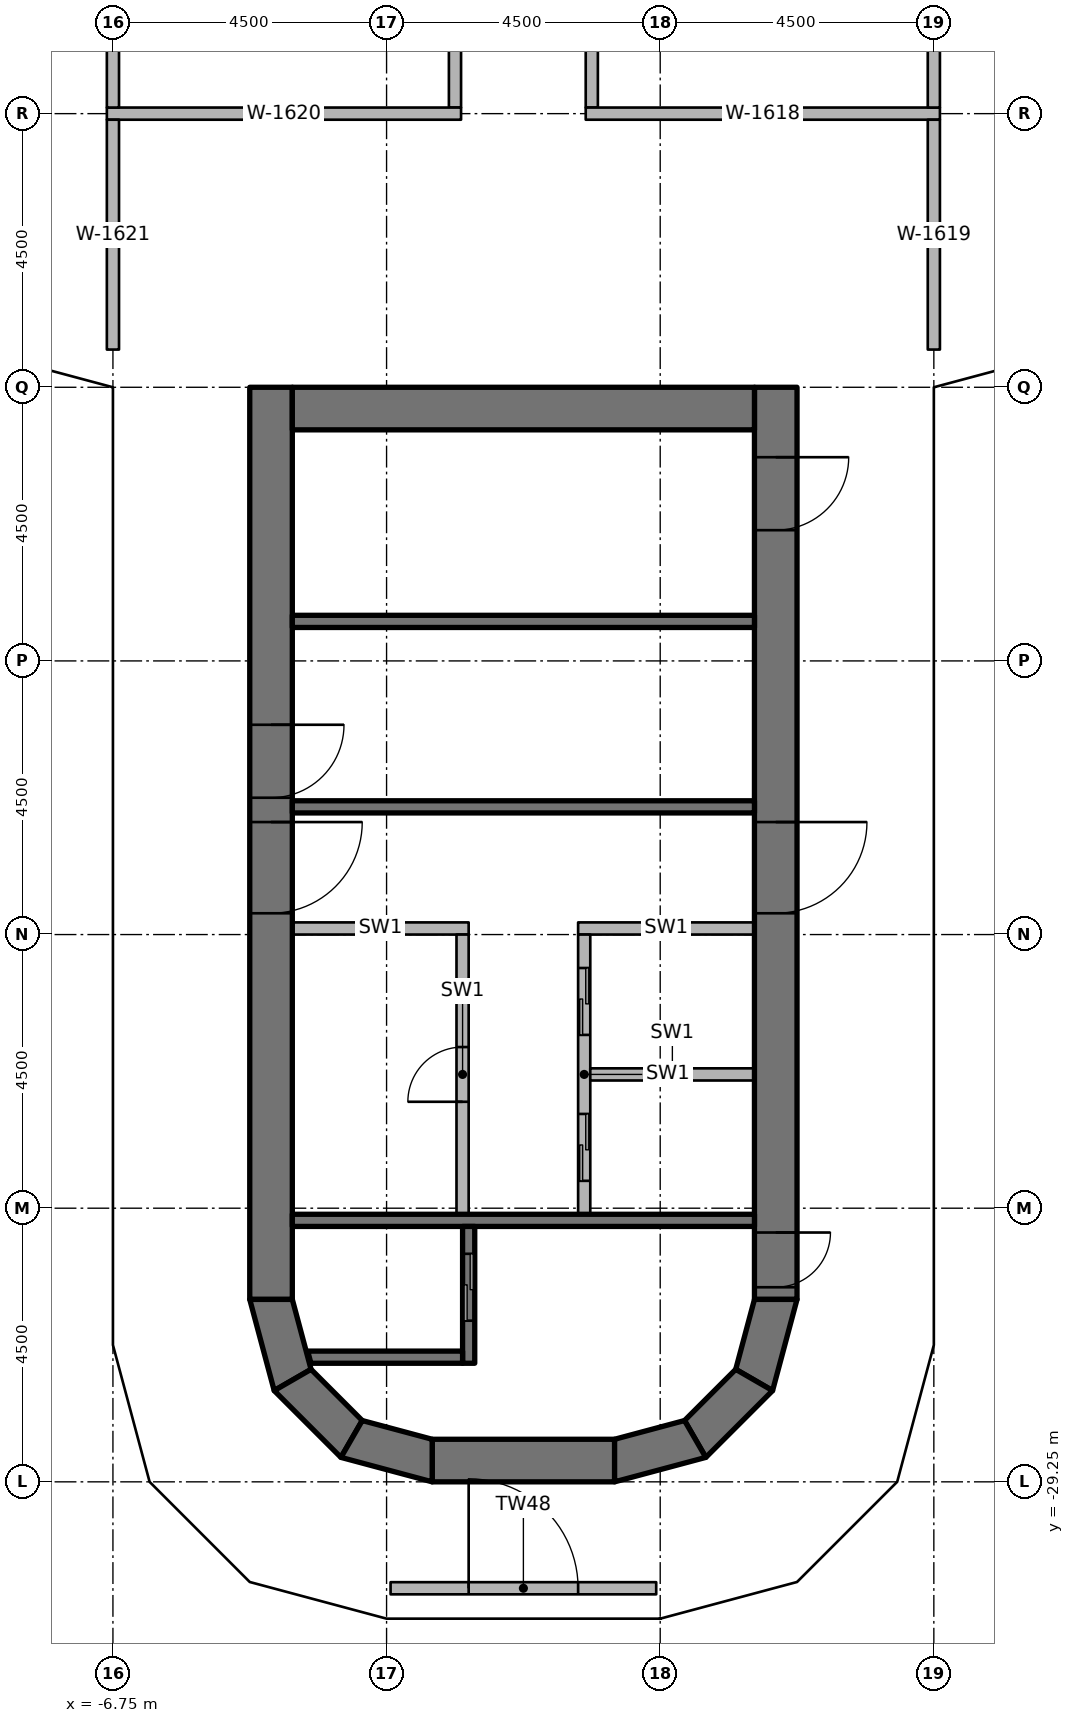
"""IFC4 building model, lengths in metres.
Left out: names, types, materials, properties, quantities, classifications, styles, units other than length and angle.
Written with IfcOpenShell. Run it as: python <this file> out.ifc"""

import sys

from ifc_helpers import new_model, si_unit, direction, frame, frame_2d, origin, origin_2d, place, context, subcontext, project, spatial, polyline, rectangle, outline, extrude, element, fill, save


model = new_model("IFC4")
c1 = context("Model", 3, precision=1e-05, world=origin(), true_north=direction((0.0, 1.0)))
c2 = subcontext(c1, "Body", "Model", "MODEL_VIEW")
j1 = project(units=[si_unit("LENGTHUNIT", "METRE"), si_unit("PLANEANGLEUNIT", "RADIAN")], contexts=[c1])
p1 = place(None, origin())
s1 = spatial("IfcSite", under=j1, at=p1, CompositionType="ELEMENT")
p2 = place(p1, origin())
s2 = spatial("IfcBuilding", under=s1, at=p2, CompositionType="ELEMENT")
p3 = place(p2, frame((0.0, 0.0, 156.2)))
s3 = spatial("IfcBuildingStorey", under=s2, at=p3, CompositionType="ELEMENT", Elevation=156.2)
for number, where, z_axis, x_axis in (
    (1, (-6.25, -26.9, 0.0), (0.0, 0.0, 1.0), (1.0, 0.0, 0.0)),
    (2, (-6.25, -24.65, 0.0), (0.0, 0.0, 1.0), (1.0, 0.0, 0.0)),
    (3, (-6.25, -20.25, 0.0), (0.0, 0.0, 1.0), (1.0, 0.0, 0.0)),
    (4, (-6.25, -15.75, 0.0), (0.0, 0.0, 1.0), (1.0, 0.0, 0.0)),
    (5, (-6.25, -10.75, 0.0), (0.0, 0.0, 1.0), (1.0, 0.0, 0.0)),
    (6, (-6.25, -6.25, 0.0), (0.0, 0.0, 1.0), (1.0, 0.0, 0.0)),
    (7, (6.25, -26.9, 0.0), (0.0, 0.0, 1.0), (1.0, 0.0, 0.0)),
    (8, (6.25, -24.65, 0.0), (0.0, 0.0, 1.0), (1.0, 0.0, 0.0)),
    (9, (6.25, -20.25, 0.0), (0.0, 0.0, 1.0), (1.0, 0.0, 0.0)),
    (10, (6.25, -15.75, 0.0), (0.0, 0.0, 1.0), (1.0, 0.0, 0.0)),
    (11, (6.25, -10.75, 0.0), (0.0, 0.0, 1.0), (1.0, 0.0, 0.0)),
    (12, (6.25, -6.25, 0.0), (0.0, 0.0, 1.0), (1.0, 0.0, 0.0)),
):
    element("IfcColumn", number, at=place(p3, frame(where, z_axis=z_axis, x_axis=x_axis)), inside=s3, PredefinedType="COLUMN", context=c2, shape_type="SweptSolid", body=[
        extrude(rectangle(XDim=0.8, YDim=0.8, at=origin_2d()), origin(), (0.0, 0.0, 1.0), 3.65),
    ])
p4 = place(p3, frame((-4.15, -11.25, 0.0), z_axis=(0.0, 0.0, 1.0), x_axis=(0.0, -1.0, 0.0)))
e13 = element("IfcWall", 13, at=p4, inside=s3, PredefinedType="SHEAR", context=c2, shape_type="SweptSolid", body=[
    extrude(rectangle(XDim=15.0, YDim=0.7, at=frame_2d((7.5, 0.0))), origin(), (0.0, 0.0, 1.0), 3.8),
])
p5 = place(p4, frame((7.15, 0.0, 0.0)))
e14 = element("IfcOpeningElement", 14, at=p5, cuts=e13, PredefinedType="OPENING", context=c2, shape_type="SweptSolid", body=[
    extrude(rectangle(XDim=1.5, YDim=2.3, at=frame_2d((0.75, 1.15))), frame((0.0, 0.36, 0.0), z_axis=(0.0, -1.0, 0.0), x_axis=(1.0, 0.0, 0.0)), (0.0, 0.0, 1.0), 0.72),
])
p6 = place(p4, frame((5.55, 0.0, 0.0)))
e15 = element("IfcOpeningElement", 15, at=p6, cuts=e13, PredefinedType="OPENING", context=c2, shape_type="SweptSolid", body=[
    extrude(rectangle(XDim=1.2, YDim=2.1, at=frame_2d((0.6, 1.05))), frame((0.0, 0.36, 0.0), z_axis=(0.0, -1.0, 0.0), x_axis=(1.0, 0.0, 0.0)), (0.0, 0.0, 1.0), 0.72),
])
p7 = place(p3, frame((4.15, -11.25, 0.0), z_axis=(0.0, 0.0, 1.0), x_axis=(0.0, -1.0, 0.0)))
e16 = element("IfcWall", 16, at=p7, inside=s3, PredefinedType="SHEAR", context=c2, shape_type="SweptSolid", body=[
    extrude(rectangle(XDim=15.0, YDim=0.7, at=frame_2d((7.5, 0.0))), origin(), (0.0, 0.0, 1.0), 3.8),
])
p8 = place(p7, frame((7.15, 0.0, 0.0)))
e17 = element("IfcOpeningElement", 17, at=p8, cuts=e16, PredefinedType="OPENING", context=c2, shape_type="SweptSolid", body=[
    extrude(rectangle(XDim=1.5, YDim=2.3, at=frame_2d((0.75, 1.15))), frame((0.0, 0.36, 0.0), z_axis=(0.0, -1.0, 0.0), x_axis=(1.0, 0.0, 0.0)), (0.0, 0.0, 1.0), 0.72),
])
p9 = place(p7, frame((13.9, 0.0, 0.0)))
e18 = element("IfcOpeningElement", 18, at=p9, cuts=e16, PredefinedType="OPENING", context=c2, shape_type="SweptSolid", body=[
    extrude(rectangle(XDim=0.9, YDim=2.1, at=frame_2d((0.45, 1.05))), frame((0.0, 0.36, 0.0), z_axis=(0.0, -1.0, 0.0), x_axis=(1.0, 0.0, 0.0)), (0.0, 0.0, 1.0), 0.72),
])
p10 = place(p7, frame((1.15, 0.0, 0.0)))
e19 = element("IfcOpeningElement", 19, at=p10, cuts=e16, PredefinedType="OPENING", context=c2, shape_type="SweptSolid", body=[
    extrude(rectangle(XDim=1.2, YDim=2.1, at=frame_2d((0.6, 1.05))), frame((0.0, 0.36, 0.0), z_axis=(0.0, -1.0, 0.0), x_axis=(1.0, 0.0, 0.0)), (0.0, 0.0, 1.0), 0.72),
])
p11 = place(p3, frame((-3.8, -11.6, 0.0), z_axis=(0.0, 0.0, 1.0), x_axis=(1.0, 0.0, 0.0)))
e20 = element("IfcWall", 20, at=p11, inside=s3, PredefinedType="SHEAR", context=c2, shape_type="SweptSolid", body=[
    extrude(rectangle(XDim=7.6, YDim=0.7, at=frame_2d((3.8, 0.0))), origin(), (0.0, 0.0, 1.0), 3.8),
])
p12 = place(p3, frame((-1.5, -28.9, 0.0), z_axis=(0.0, 0.0, 1.0), x_axis=(1.0, 0.0, 0.0)))
e21 = element("IfcWall", 21, at=p12, inside=s3, PredefinedType="SHEAR", context=c2, shape_type="SweptSolid", body=[
    extrude(rectangle(XDim=3.0, YDim=0.7, at=frame_2d((1.5, 0.0))), origin(), (0.0, 0.0, 1.0), 3.8),
])
p13 = place(p3, origin())
e22 = element("IfcWall", 22, at=p13, inside=s3, PredefinedType="SHEAR", context=c2, shape_type="SweptSolid", body=[
    extrude(outline(polyline([(-4.5, -26.25), (-4.098, -27.75), (-3.492, -27.4), (-3.8, -26.25), (-4.5, -26.25)])), origin(), (0.0, 0.0, 1.0), 3.8),
])
p14 = place(p3, origin())
e23 = element("IfcWall", 23, at=p14, inside=s3, PredefinedType="SHEAR", context=c2, shape_type="SweptSolid", body=[
    extrude(outline(polyline([(-4.098, -27.75), (-3.0, -28.848), (-2.65, -28.242), (-3.492, -27.4), (-4.098, -27.75)])), origin(), (0.0, 0.0, 1.0), 3.8),
])
p15 = place(p3, origin())
e24 = element("IfcWall", 24, at=p15, inside=s3, PredefinedType="SHEAR", context=c2, shape_type="SweptSolid", body=[
    extrude(outline(polyline([(-3.0, -28.848), (-1.5, -29.25), (-1.5, -28.55), (-2.65, -28.242), (-3.0, -28.848)])), origin(), (0.0, 0.0, 1.0), 3.8),
])
p16 = place(p3, origin())
e25 = element("IfcWall", 25, at=p16, inside=s3, PredefinedType="SHEAR", context=c2, shape_type="SweptSolid", body=[
    extrude(outline(polyline([(4.5, -26.25), (4.098, -27.75), (3.492, -27.4), (3.8, -26.25), (4.5, -26.25)])), origin(), (0.0, 0.0, 1.0), 3.8),
])
p17 = place(p3, origin())
e26 = element("IfcWall", 26, at=p17, inside=s3, PredefinedType="SHEAR", context=c2, shape_type="SweptSolid", body=[
    extrude(outline(polyline([(4.098, -27.75), (3.0, -28.848), (2.65, -28.242), (3.492, -27.4), (4.098, -27.75)])), origin(), (0.0, 0.0, 1.0), 3.8),
])
p18 = place(p3, origin())
e27 = element("IfcWall", 27, at=p18, inside=s3, PredefinedType="SHEAR", context=c2, shape_type="SweptSolid", body=[
    extrude(outline(polyline([(3.0, -28.848), (1.5, -29.25), (1.5, -28.55), (2.65, -28.242), (3.0, -28.848)])), origin(), (0.0, 0.0, 1.0), 3.8),
])
p19 = place(p3, frame((-2.184, -31.0, 0.0), z_axis=(0.0, 0.0, 1.0), x_axis=(1.0, 0.0, 0.0)))
e28 = element("IfcWall", 28, at=p19, inside=s3, PredefinedType="SOLIDWALL", context=c2, shape_type="SweptSolid", body=[
    extrude(rectangle(XDim=4.368, YDim=0.2, at=frame_2d((2.184, 0.0))), origin(), (0.0, 0.0, 1.0), 2.75),
])
p20 = place(p19, frame((1.284, 0.0, 0.0)))
e29 = element("IfcOpeningElement", 29, at=p20, cuts=e28, PredefinedType="OPENING", context=c2, shape_type="SweptSolid", body=[
    extrude(rectangle(XDim=1.8, YDim=2.4, at=frame_2d((0.9, 1.2))), frame((0.0, 0.11, 0.0), z_axis=(0.0, -1.0, 0.0), x_axis=(1.0, 0.0, 0.0)), (0.0, 0.0, 1.0), 0.22),
])
p21 = place(p3, frame((3.8, -24.95, 0.0), z_axis=(0.0, 0.0, 1.0), x_axis=(-1.0, 0.0, 0.0)))
e30 = element("IfcWall", 30, at=p21, inside=s3, PredefinedType="SHEAR", context=c2, shape_type="SweptSolid", body=[
    extrude(rectangle(XDim=7.6, YDim=0.2, at=frame_2d((3.8, 0.0))), origin(), (0.0, 0.0, 1.0), 3.65),
])
p22 = place(p3, frame((-0.9, -27.3, 0.0), z_axis=(0.0, 0.0, 1.0), x_axis=(0.0, 1.0, 0.0)))
e31 = element("IfcWall", 31, at=p22, inside=s3, PredefinedType="SHEAR", context=c2, shape_type="SweptSolid", body=[
    extrude(rectangle(XDim=2.25, YDim=0.2, at=frame_2d((1.125, 0.0))), origin(), (0.0, 0.0, 1.0), 3.65),
])
p23 = place(p22, frame((0.7, 0.0, 0.0)))
e32 = element("IfcOpeningElement", 32, at=p23, cuts=e31, PredefinedType="OPENING", context=c2, shape_type="SweptSolid", body=[
    extrude(rectangle(XDim=1.1, YDim=2.3, at=frame_2d((0.55, 1.15))), frame((0.0, 0.11, 0.0), z_axis=(0.0, -1.0, 0.0), x_axis=(1.0, 0.0, 0.0)), (0.0, 0.0, 1.0), 0.22),
])
p24 = place(p3, origin())
e33 = element("IfcWall", 33, at=p24, inside=s3, PredefinedType="SHEAR", context=c2, shape_type="SweptSolid", body=[
    extrude(outline(polyline([(-1.0, -27.1), (-3.548, -27.1), (-3.494, -27.3), (-1.0, -27.3), (-1.0, -27.1)])), origin(), (0.0, 0.0, 1.0), 3.65),
])
for number, where, z_axis, x_axis in (
    (34, (3.8, -18.15, 0.0), (0.0, 0.0, 1.0), (-1.0, 0.0, 0.0)),
    (35, (3.8, -15.1, 0.0), (0.0, 0.0, 1.0), (-1.0, 0.0, 0.0)),
):
    element("IfcWall", number, at=place(p3, frame(where, z_axis=z_axis, x_axis=x_axis)), inside=s3, PredefinedType="SHEAR", context=c2, shape_type="SweptSolid", body=[
        extrude(rectangle(XDim=7.6, YDim=0.2, at=frame_2d((3.8, 0.0))), origin(), (0.0, 0.0, 1.0), 3.65),
    ])
p25 = place(p3, frame((3.8, -20.15, 0.0), z_axis=(0.0, 0.0, 1.0), x_axis=(-1.0, 0.0, 0.0)))
e36 = element("IfcWall", 36, at=p25, inside=s3, PredefinedType="PARTITIONING", context=c2, shape_type="SweptSolid", body=[
    extrude(rectangle(XDim=2.9, YDim=0.2, at=frame_2d((1.45, 0.0))), origin(), (0.0, 0.0, 1.0), 3.65),
])
p26 = place(p3, frame((1.0, -24.85, 0.0), z_axis=(0.0, 0.0, 1.0), x_axis=(0.0, 1.0, 0.0)))
e37 = element("IfcWall", 37, at=p26, inside=s3, PredefinedType="PARTITIONING", context=c2, shape_type="SweptSolid", body=[
    extrude(rectangle(XDim=4.6, YDim=0.2, at=frame_2d((2.3, 0.0))), origin(), (0.0, 0.0, 1.0), 3.65),
])
p27 = place(p26, frame((0.55, 0.0, 0.0)))
e38 = element("IfcOpeningElement", 38, at=p27, cuts=e37, PredefinedType="OPENING", context=c2, shape_type="SweptSolid", body=[
    extrude(rectangle(XDim=1.1, YDim=2.3, at=frame_2d((0.55, 1.15))), frame((0.0, 0.11, 0.0), z_axis=(0.0, -1.0, 0.0), x_axis=(1.0, 0.0, 0.0)), (0.0, 0.0, 1.0), 0.22),
])
p28 = place(p26, frame((2.95, 0.0, 0.0)))
e39 = element("IfcOpeningElement", 39, at=p28, cuts=e37, PredefinedType="OPENING", context=c2, shape_type="SweptSolid", body=[
    extrude(rectangle(XDim=1.1, YDim=2.3, at=frame_2d((0.55, 1.15))), frame((0.0, 0.11, 0.0), z_axis=(0.0, -1.0, 0.0), x_axis=(1.0, 0.0, 0.0)), (0.0, 0.0, 1.0), 0.22),
])
p29 = place(p3, frame((-0.9, -20.15, 0.0), z_axis=(0.0, 0.0, 1.0), x_axis=(-1.0, 0.0, 0.0)))
e40 = element("IfcWall", 40, at=p29, inside=s3, PredefinedType="PARTITIONING", context=c2, shape_type="SweptSolid", body=[
    extrude(rectangle(XDim=2.9, YDim=0.2, at=frame_2d((1.45, 0.0))), origin(), (0.0, 0.0, 1.0), 3.65),
])
p30 = place(p3, frame((-1.0, -24.85, 0.0), z_axis=(0.0, 0.0, 1.0), x_axis=(0.0, 1.0, 0.0)))
e41 = element("IfcWall", 41, at=p30, inside=s3, PredefinedType="PARTITIONING", context=c2, shape_type="SweptSolid", body=[
    extrude(rectangle(XDim=4.6, YDim=0.2, at=frame_2d((2.3, 0.0))), origin(), (0.0, 0.0, 1.0), 3.65),
])
p31 = place(p30, frame((1.85, 0.0, 0.0)))
e42 = element("IfcOpeningElement", 42, at=p31, cuts=e41, PredefinedType="OPENING", context=c2, shape_type="SweptSolid", body=[
    extrude(rectangle(XDim=0.9, YDim=2.1, at=frame_2d((0.45, 1.05))), frame((0.0, 0.11, 0.0), z_axis=(0.0, -1.0, 0.0), x_axis=(1.0, 0.0, 0.0)), (0.0, 0.0, 1.0), 0.22),
])
p32 = place(p3, frame((3.8, -22.55, 0.0), z_axis=(0.0, 0.0, 1.0), x_axis=(-1.0, 0.0, 0.0)))
e43 = element("IfcWall", 43, at=p32, inside=s3, PredefinedType="PARTITIONING", context=c2, shape_type="SweptSolid", body=[
    extrude(rectangle(XDim=2.7, YDim=0.2, at=frame_2d((1.35, 0.0))), origin(), (0.0, 0.0, 1.0), 3.65),
])
for number, where, z_axis, x_axis in (
    (44, (1.125, -6.65, 0.0), (0.0, 0.0, 1.0), (0.0, 1.0, 0.0)),
    (45, (-1.125, -6.65, 0.0), (0.0, 0.0, 1.0), (0.0, 1.0, 0.0)),
):
    element("IfcWall", number, at=place(p3, frame(where, z_axis=z_axis, x_axis=x_axis)), inside=s3, PredefinedType="PARTITIONING", context=c2, shape_type="SweptSolid", body=[
        extrude(rectangle(XDim=5.425, YDim=0.2, at=frame_2d((2.712, 0.0))), origin(), (0.0, 0.0, 1.0), 2.75),
    ])
p33 = place(p3, frame((1.025, -6.75, 0.0), z_axis=(0.0, 0.0, 1.0), x_axis=(1.0, 0.0, 0.0)))
e46 = element("IfcWall", 46, at=p33, inside=s3, PredefinedType="PARTITIONING", context=c2, shape_type="SweptSolid", body=[
    extrude(rectangle(XDim=5.825, YDim=0.2, at=frame_2d((2.913, 0.0))), origin(), (0.0, 0.0, 1.0), 2.75),
])
p34 = place(p3, frame((6.75, -10.63, 0.0), z_axis=(0.0, 0.0, 1.0), x_axis=(0.0, 1.0, 0.0)))
e47 = element("IfcWall", 47, at=p34, inside=s3, PredefinedType="PARTITIONING", context=c2, shape_type="SweptSolid", body=[
    extrude(rectangle(XDim=3.78, YDim=0.2, at=frame_2d((1.89, 0.0))), origin(), (0.0, 0.0, 1.0), 2.75),
])
p35 = place(p3, frame((-6.85, -6.75, 0.0), z_axis=(0.0, 0.0, 1.0), x_axis=(1.0, 0.0, 0.0)))
e48 = element("IfcWall", 48, at=p35, inside=s3, PredefinedType="PARTITIONING", context=c2, shape_type="SweptSolid", body=[
    extrude(rectangle(XDim=5.825, YDim=0.2, at=frame_2d((2.913, 0.0))), origin(), (0.0, 0.0, 1.0), 2.75),
])
p36 = place(p3, frame((-6.75, -10.63, 0.0), z_axis=(0.0, 0.0, 1.0), x_axis=(0.0, 1.0, 0.0)))
e49 = element("IfcWall", 49, at=p36, inside=s3, PredefinedType="PARTITIONING", context=c2, shape_type="SweptSolid", body=[
    extrude(rectangle(XDim=3.78, YDim=0.2, at=frame_2d((1.89, 0.0))), origin(), (0.0, 0.0, 1.0), 2.75),
])
for number, where, z_axis, x_axis in (
    (50, (6.75, -6.65, 0.0), (0.0, 0.0, 1.0), (0.0, 1.0, 0.0)),
    (51, (-6.75, -6.65, 0.0), (0.0, 0.0, 1.0), (0.0, 1.0, 0.0)),
):
    element("IfcWall", number, at=place(p3, frame(where, z_axis=z_axis, x_axis=x_axis)), inside=s3, PredefinedType="PARTITIONING", context=c2, shape_type="SweptSolid", body=[
        extrude(rectangle(XDim=5.425, YDim=0.2, at=frame_2d((2.712, 0.0))), origin(), (0.0, 0.0, 1.0), 2.75),
    ])
p37 = place(p20, origin())
e52 = element("IfcDoor", 52, at=p37, inside=s3, OperationType="SINGLE_SWING_LEFT", PredefinedType="DOOR", context=c2, shape_type="SweptSolid", body=[
    extrude(rectangle(XDim=1.8, YDim=2.4, at=frame_2d((0.9, 1.2))), frame((0.0, 0.025, 0.0), z_axis=(0.0, -1.0, 0.0), x_axis=(1.0, 0.0, 0.0)), (0.0, 0.0, 1.0), 0.05),
])
fill(e29, e52)
p38 = place(p8, origin())
e53 = element("IfcDoor", 53, at=p38, inside=s3, OperationType="DOUBLE_DOOR_SINGLE_SWING", PredefinedType="DOOR", context=c2, shape_type="SweptSolid", body=[
    extrude(rectangle(XDim=1.5, YDim=2.3, at=frame_2d((0.75, 1.15))), frame((0.0, 0.025, 0.0), z_axis=(0.0, -1.0, 0.0), x_axis=(1.0, 0.0, 0.0)), (0.0, 0.0, 1.0), 0.05),
])
fill(e17, e53)
p39 = place(p5, origin())
e54 = element("IfcDoor", 54, at=p39, inside=s3, OperationType="DOUBLE_DOOR_SINGLE_SWING", PredefinedType="DOOR", context=c2, shape_type="SweptSolid", body=[
    extrude(rectangle(XDim=1.5, YDim=2.3, at=frame_2d((0.75, 1.15))), frame((0.0, 0.025, 0.0), z_axis=(0.0, -1.0, 0.0), x_axis=(1.0, 0.0, 0.0)), (0.0, 0.0, 1.0), 0.05),
])
fill(e14, e54)
p40 = place(p9, origin())
e55 = element("IfcDoor", 55, at=p40, inside=s3, OperationType="SINGLE_SWING_LEFT", PredefinedType="DOOR", context=c2, shape_type="SweptSolid", body=[
    extrude(rectangle(XDim=0.9, YDim=2.1, at=frame_2d((0.45, 1.05))), frame((0.0, 0.025, 0.0), z_axis=(0.0, -1.0, 0.0), x_axis=(1.0, 0.0, 0.0)), (0.0, 0.0, 1.0), 0.05),
])
fill(e18, e55)
p41 = place(p6, origin())
e56 = element("IfcDoor", 56, at=p41, inside=s3, OperationType="SINGLE_SWING_LEFT", PredefinedType="DOOR", context=c2, shape_type="SweptSolid", body=[
    extrude(rectangle(XDim=1.2, YDim=2.1, at=frame_2d((0.6, 1.05))), frame((0.0, 0.025, 0.0), z_axis=(0.0, -1.0, 0.0), x_axis=(1.0, 0.0, 0.0)), (0.0, 0.0, 1.0), 0.05),
])
fill(e15, e56)
p42 = place(p10, origin())
e57 = element("IfcDoor", 57, at=p42, inside=s3, OperationType="SINGLE_SWING_LEFT", PredefinedType="DOOR", context=c2, shape_type="SweptSolid", body=[
    extrude(rectangle(XDim=1.2, YDim=2.1, at=frame_2d((0.6, 1.05))), frame((0.0, 0.025, 0.0), z_axis=(0.0, -1.0, 0.0), x_axis=(1.0, 0.0, 0.0)), (0.0, 0.0, 1.0), 0.05),
])
fill(e19, e57)
p43 = place(p23, origin())
e58 = element("IfcDoor", 58, at=p43, inside=s3, OperationType="DOUBLE_DOOR_SLIDING", PredefinedType="DOOR", context=c2, shape_type="SweptSolid", body=[
    extrude(rectangle(XDim=1.1, YDim=2.3, at=frame_2d((0.55, 1.15))), frame((0.0, 0.025, 0.0), z_axis=(0.0, -1.0, 0.0), x_axis=(1.0, 0.0, 0.0)), (0.0, 0.0, 1.0), 0.05),
])
fill(e32, e58)
p44 = place(p27, origin())
e59 = element("IfcDoor", 59, at=p44, inside=s3, OperationType="DOUBLE_DOOR_SLIDING", PredefinedType="DOOR", context=c2, shape_type="SweptSolid", body=[
    extrude(rectangle(XDim=1.1, YDim=2.3, at=frame_2d((0.55, 1.15))), frame((0.0, 0.025, 0.0), z_axis=(0.0, -1.0, 0.0), x_axis=(1.0, 0.0, 0.0)), (0.0, 0.0, 1.0), 0.05),
])
fill(e38, e59)
p45 = place(p28, origin())
e60 = element("IfcDoor", 60, at=p45, inside=s3, OperationType="DOUBLE_DOOR_SLIDING", PredefinedType="DOOR", context=c2, shape_type="SweptSolid", body=[
    extrude(rectangle(XDim=1.1, YDim=2.3, at=frame_2d((0.55, 1.15))), frame((0.0, 0.025, 0.0), z_axis=(0.0, -1.0, 0.0), x_axis=(1.0, 0.0, 0.0)), (0.0, 0.0, 1.0), 0.05),
])
fill(e39, e60)
p46 = place(p31, origin())
e61 = element("IfcDoor", 61, at=p46, inside=s3, OperationType="SINGLE_SWING_LEFT", PredefinedType="DOOR", context=c2, shape_type="SweptSolid", body=[
    extrude(rectangle(XDim=0.9, YDim=2.1, at=frame_2d((0.45, 1.05))), frame((0.0, 0.025, 0.0), z_axis=(0.0, -1.0, 0.0), x_axis=(1.0, 0.0, 0.0)), (0.0, 0.0, 1.0), 0.05),
])
fill(e42, e61)
save(model, sys.argv[1])
